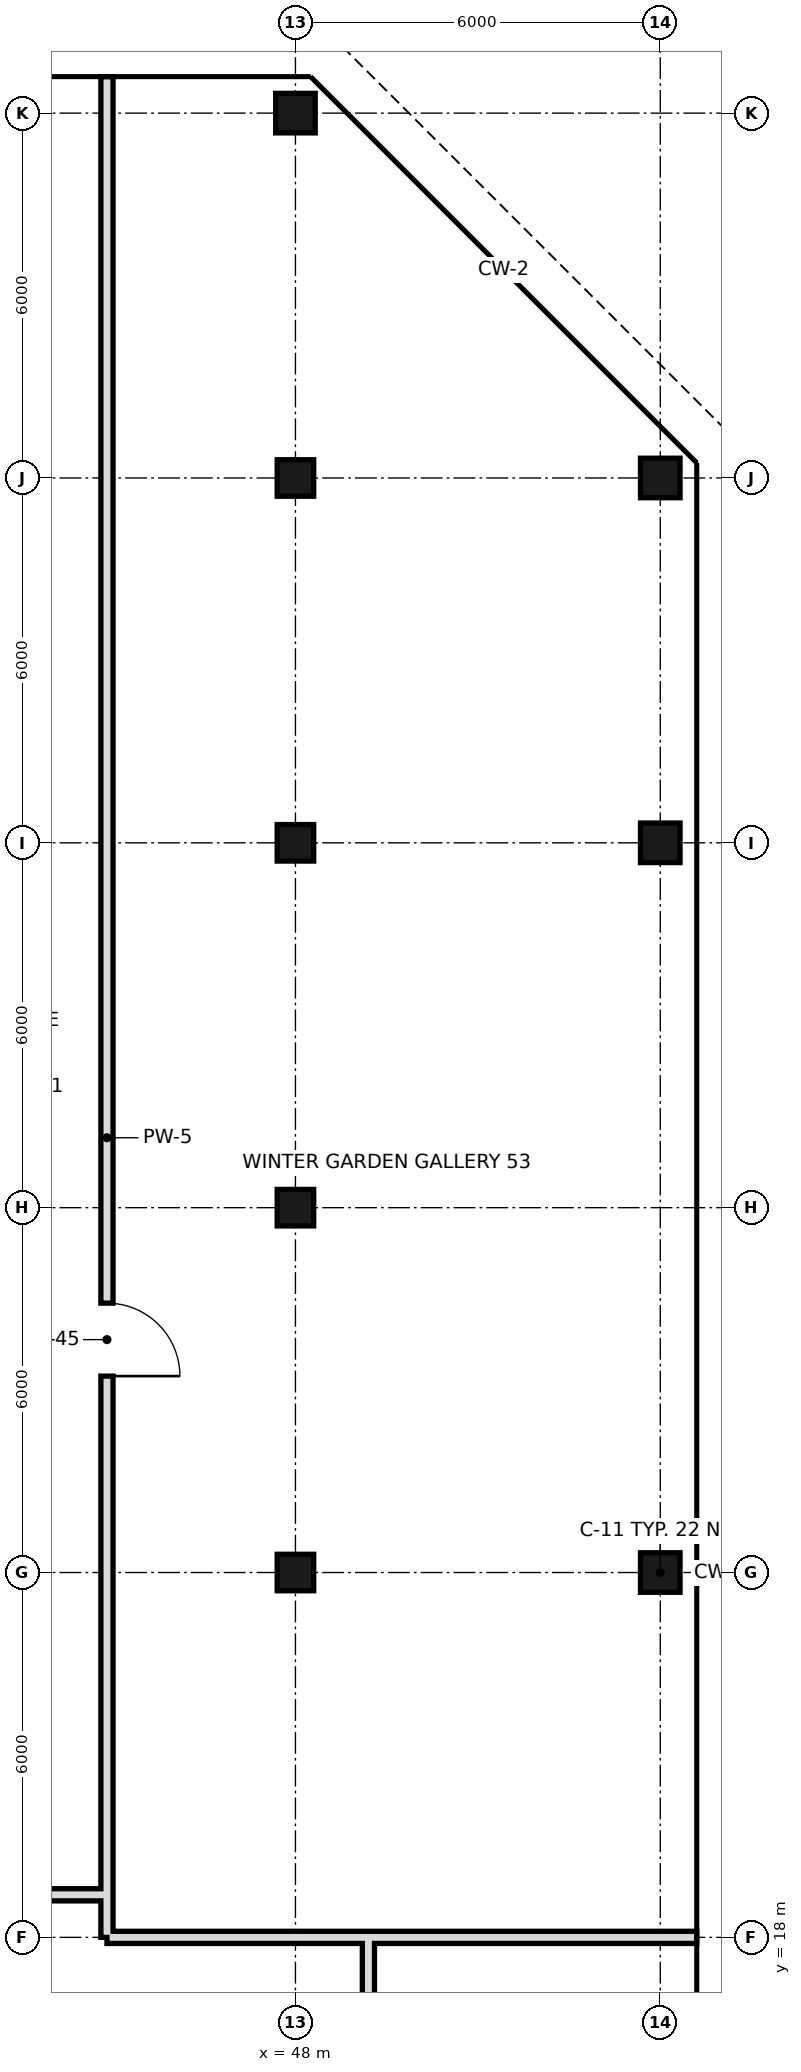
"""IFC4 building model, lengths in metres.
Left out: names, types, materials, properties, quantities, classifications, styles, units other than length and angle.
Written with IfcOpenShell. Run it as: python <this file> out.ifc"""

import sys

from ifc_helpers import new_model, si_unit, direction, frame, frame_2d, origin, origin_2d, place, context, subcontext, project, spatial, rectangle, hollow_rectangle, extrude, element, fill, save


model = new_model("IFC4")
c1 = context("Model", 3, precision=1e-05, world=origin(), true_north=direction((0.0, 1.0)))
c2 = subcontext(c1, "Body", "Model", "MODEL_VIEW")
j1 = project(units=[si_unit("LENGTHUNIT", "METRE"), si_unit("PLANEANGLEUNIT", "RADIAN")], contexts=[c1])
p1 = place(None, origin())
s1 = spatial("IfcSite", under=j1, at=p1, CompositionType="ELEMENT")
p2 = place(p1, origin())
s2 = spatial("IfcBuilding", under=s1, at=p2, CompositionType="ELEMENT")
p3 = place(p2, frame((0.0, 0.0, 226.2)))
s3 = spatial("IfcBuildingStorey", under=s2, at=p3, CompositionType="ELEMENT", Elevation=226.2)
for number, where, z_axis, x_axis in (
    (1, (48.0, 24.0, 0.0), (0.0, 0.0, 1.0), (1.0, 0.0, 0.0)),
    (2, (48.0, 30.0, 0.0), (0.0, 0.0, 1.0), (1.0, 0.0, 0.0)),
    (3, (48.0, 36.0, 0.0), (0.0, 0.0, 1.0), (1.0, 0.0, 0.0)),
    (4, (48.0, 42.0, 0.0), (0.0, 0.0, 1.0), (1.0, 0.0, 0.0)),
):
    element("IfcColumn", number, at=place(p3, frame(where, z_axis=z_axis, x_axis=x_axis)), inside=s3, PredefinedType="COLUMN", context=c2, shape_type="SweptSolid", body=[
        extrude(hollow_rectangle(XDim=0.6, YDim=0.6, WallThickness=0.028, at=origin_2d()), origin(), (0.0, 0.0, 1.0), 3.6),
    ])
for number, where, z_axis, x_axis in (
    (5, (48.0, 48.0, 0.0), (0.0, 0.0, 1.0), (1.0, 0.0, 0.0)),
    (6, (54.0, 24.0, 0.0), (0.0, 0.0, 1.0), (1.0, 0.0, 0.0)),
    (7, (54.0, 36.0, 0.0), (0.0, 0.0, 1.0), (1.0, 0.0, 0.0)),
    (8, (54.0, 42.0, 0.0), (0.0, 0.0, 1.0), (1.0, 0.0, 0.0)),
):
    element("IfcColumn", number, at=place(p3, frame(where, z_axis=z_axis, x_axis=x_axis)), inside=s3, PredefinedType="COLUMN", context=c2, shape_type="SweptSolid", body=[
        extrude(hollow_rectangle(XDim=0.65, YDim=0.65, WallThickness=0.032, at=origin_2d()), origin(), (0.0, 0.0, 1.0), 3.6),
    ])
p4 = place(p3, frame((44.9, 18.0, 0.0), z_axis=(0.0, 0.0, 1.0), x_axis=(0.0, 1.0, 0.0)))
e9 = element("IfcWall", 9, at=p4, inside=s3, PredefinedType="SOLIDWALL", context=c2, shape_type="SweptSolid", body=[
    extrude(rectangle(XDim=30.6, YDim=0.2, at=frame_2d((15.3, 0.0))), origin(), (0.0, 0.0, 1.0), 2.72),
])
p5 = place(p4, frame((9.23, 0.0, 0.0)))
e10 = element("IfcOpeningElement", 10, at=p5, cuts=e9, PredefinedType="OPENING", context=c2, shape_type="SweptSolid", body=[
    extrude(rectangle(XDim=1.2, YDim=2.4, at=frame_2d((0.6, 1.2))), frame((0.0, 0.11, 0.0), z_axis=(0.0, -1.0, 0.0), x_axis=(1.0, 0.0, 0.0)), (0.0, 0.0, 1.0), 0.22),
])
p6 = place(p3, frame((49.2, 10.8, 0.0), z_axis=(0.0, 0.0, 1.0), x_axis=(0.0, 1.0, 0.0)))
e11 = element("IfcWall", 11, at=p6, inside=s3, PredefinedType="SOLIDWALL", context=c2, shape_type="SweptSolid", body=[
    extrude(rectangle(XDim=7.2, YDim=0.2, at=frame_2d((3.6, 0.0))), origin(), (0.0, 0.0, 1.0), 2.97),
])
p7 = place(p3, frame((44.9, 18.0, 0.0), z_axis=(0.0, 0.0, 1.0), x_axis=(1.0, 0.0, 0.0)))
e12 = element("IfcWall", 12, at=p7, inside=s3, PredefinedType="SOLIDWALL", context=c2, shape_type="SweptSolid", body=[
    extrude(rectangle(XDim=4.3, YDim=0.2, at=frame_2d((2.15, 0.0))), origin(), (0.0, 0.0, 1.0), 2.72),
])
p8 = place(p3, frame((49.2, 18.0, 0.0), z_axis=(0.0, 0.0, 1.0), x_axis=(1.0, 0.0, 0.0)))
e13 = element("IfcWall", 13, at=p8, inside=s3, PredefinedType="SOLIDWALL", context=c2, shape_type="SweptSolid", body=[
    extrude(rectangle(XDim=5.4, YDim=0.2, at=frame_2d((2.7, 0.0))), origin(), (0.0, 0.0, 1.0), 2.72),
])
p9 = place(p3, frame((3.1, 18.7, 0.0), z_axis=(0.0, 0.0, 1.0), x_axis=(1.0, 0.0, 0.0)))
e14 = element("IfcWall", 14, at=p9, inside=s3, PredefinedType="SOLIDWALL", context=c2, shape_type="SweptSolid", body=[
    extrude(rectangle(XDim=41.8, YDim=0.2, at=frame_2d((20.9, 0.0))), origin(), (0.0, 0.0, 1.0), 2.72),
])
p10 = place(p9, frame((7.36, 0.0, 0.0)))
e15 = element("IfcOpeningElement", 15, at=p10, cuts=e14, PredefinedType="OPENING", context=c2, shape_type="SweptSolid", body=[
    extrude(rectangle(XDim=1.2, YDim=2.4, at=frame_2d((0.6, 1.2))), frame((0.0, 0.11, 0.0), z_axis=(0.0, -1.0, 0.0), x_axis=(1.0, 0.0, 0.0)), (0.0, 0.0, 1.0), 0.22),
])
p11 = place(p9, frame((24.48, 0.0, 0.0)))
e16 = element("IfcOpeningElement", 16, at=p11, cuts=e14, PredefinedType="OPENING", context=c2, shape_type="SweptSolid", body=[
    extrude(rectangle(XDim=1.2, YDim=2.4, at=frame_2d((0.6, 1.2))), frame((0.0, 0.11, 0.0), z_axis=(0.0, -1.0, 0.0), x_axis=(1.0, 0.0, 0.0)), (0.0, 0.0, 1.0), 0.22),
])
p12 = place(p5, frame((1.2, 0.0, 0.0), z_axis=(0.0, 0.0, 1.0), x_axis=(-1.0, 0.0, 0.0)))
e17 = element("IfcDoor", 17, at=p12, inside=s3, OperationType="SINGLE_SWING_RIGHT", PredefinedType="DOOR", context=c2, shape_type="SweptSolid", body=[
    extrude(rectangle(XDim=1.2, YDim=2.4, at=frame_2d((0.6, 1.2))), frame((0.0, 0.025, 0.0), z_axis=(0.0, -1.0, 0.0), x_axis=(1.0, 0.0, 0.0)), (0.0, 0.0, 1.0), 0.05),
])
fill(e10, e17)
save(model, sys.argv[1])
